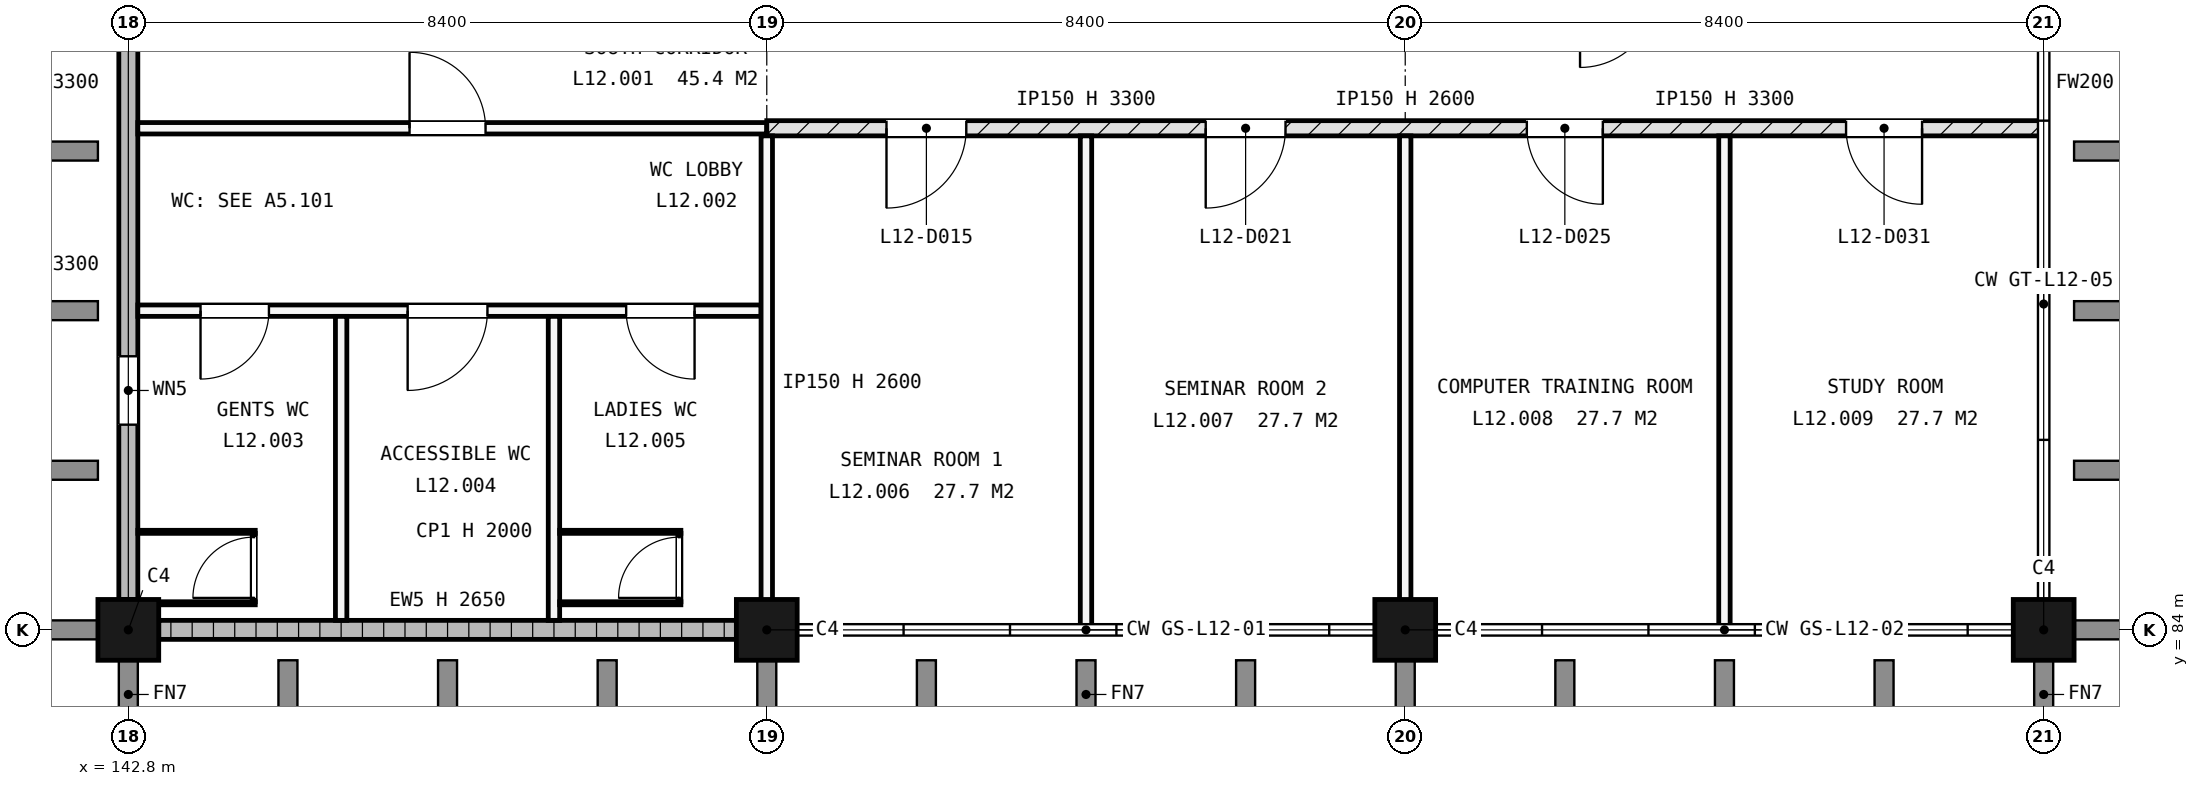
"""IFC4 building model, lengths in metres.
Left out: names, types, materials, properties, quantities, classifications, styles, units other than length and angle.
Written with IfcOpenShell. Run it as: python <this file> out.ifc"""

import sys

from ifc_helpers import new_model, si_unit, direction, frame, frame_2d, origin, origin_2d, place, context, subcontext, project, spatial, rectangle, extrude, element, fill, save


model = new_model("IFC4")
c1 = context("Model", 3, precision=1e-05, world=origin(), true_north=direction((0.0, 1.0)))
c2 = subcontext(c1, "Body", "Model", "MODEL_VIEW")
j1 = project(units=[si_unit("LENGTHUNIT", "METRE"), si_unit("PLANEANGLEUNIT", "RADIAN")], contexts=[c1])
p1 = place(None, origin())
s1 = spatial("IfcSite", under=j1, at=p1, CompositionType="ELEMENT")
p2 = place(p1, origin())
s2 = spatial("IfcBuilding", under=s1, at=p2, CompositionType="ELEMENT")
p3 = place(p2, frame((0.0, 0.0, 46.8)))
s3 = spatial("IfcBuildingStorey", under=s2, at=p3, CompositionType="ELEMENT", Elevation=46.8)
for number, where, z_axis, x_axis in (
    (1, (142.8, 84.0, -0.225), (0.0, 0.0, 1.0), (1.0, 0.0, 0.0)),
    (2, (151.2, 84.0, -0.225), (0.0, 0.0, 1.0), (1.0, 0.0, 0.0)),
    (3, (159.6, 84.0, -0.225), (0.0, 0.0, 1.0), (1.0, 0.0, 0.0)),
    (4, (168.0, 84.0, -0.225), (0.0, 0.0, 1.0), (1.0, 0.0, 0.0)),
):
    element("IfcColumn", number, at=place(p3, frame(where, z_axis=z_axis, x_axis=x_axis)), inside=s3, PredefinedType="COLUMN", context=c2, shape_type="SweptSolid", body=[
        extrude(rectangle(XDim=0.8, YDim=0.8, at=origin_2d()), origin(), (0.0, 0.0, 1.0), 3.525),
    ])
p4 = place(p3, frame((143.2, 84.0, 0.0), z_axis=(0.0, 0.0, 1.0), x_axis=(1.0, 0.0, 0.0)))
e5 = element("IfcWall", 5, at=p4, inside=s3, PredefinedType="STANDARD", context=c2, shape_type="SweptSolid", body=[
    extrude(rectangle(XDim=7.6, YDim=0.25, at=frame_2d((3.8, 0.0))), origin(), (0.0, 0.0, 1.0), 2.65),
])
p5 = place(p3, frame((142.8, 84.4, 0.0), z_axis=(0.0, 0.0, 1.0), x_axis=(0.0, 1.0, 0.0)))
e6 = element("IfcWall", 6, at=p5, inside=s3, PredefinedType="STANDARD", context=c2, shape_type="SweptSolid", body=[
    extrude(rectangle(XDim=7.8, YDim=0.25, at=frame_2d((3.9, 0.0))), origin(), (0.0, 0.0, 1.0), 3.3),
])
p6 = place(p5, frame((2.3, 0.0, 2.1)))
e7 = element("IfcOpeningElement", 7, at=p6, cuts=e6, PredefinedType="OPENING", context=c2, shape_type="SweptSolid", body=[
    extrude(rectangle(XDim=0.9, YDim=0.6, at=frame_2d((0.45, 0.3))), frame((0.0, 0.135, 0.0), z_axis=(0.0, -1.0, 0.0), x_axis=(1.0, 0.0, 0.0)), (0.0, 0.0, 1.0), 0.27),
])
p7 = place(p3, frame((142.925, 88.2, 0.0), z_axis=(0.0, 0.0, 1.0), x_axis=(1.0, 0.0, 0.0)))
e8 = element("IfcWall", 8, at=p7, inside=s3, PredefinedType="PARTITIONING", context=c2, shape_type="SweptSolid", body=[
    extrude(rectangle(XDim=8.2, YDim=0.15, at=frame_2d((4.1, 0.0))), origin(), (0.0, 0.0, 1.0), 3.3),
])
p8 = place(p7, frame((0.825, 0.0, 0.0)))
e9 = element("IfcOpeningElement", 9, at=p8, cuts=e8, PredefinedType="OPENING", context=c2, shape_type="SweptSolid", body=[
    extrude(rectangle(XDim=0.9, YDim=2.1, at=frame_2d((0.45, 1.05))), frame((0.0, 0.085, 0.0), z_axis=(0.0, -1.0, 0.0), x_axis=(1.0, 0.0, 0.0)), (0.0, 0.0, 1.0), 0.17),
])
p9 = place(p7, frame((3.55, 0.0, 0.0)))
e10 = element("IfcOpeningElement", 10, at=p9, cuts=e8, PredefinedType="OPENING", context=c2, shape_type="SweptSolid", body=[
    extrude(rectangle(XDim=1.05, YDim=2.25, at=frame_2d((0.525, 1.125))), frame((0.0, 0.085, 0.0), z_axis=(0.0, -1.0, 0.0), x_axis=(1.0, 0.0, 0.0)), (0.0, 0.0, 1.0), 0.17),
])
p10 = place(p7, frame((6.425, 0.0, 0.0)))
e11 = element("IfcOpeningElement", 11, at=p10, cuts=e8, PredefinedType="OPENING", context=c2, shape_type="SweptSolid", body=[
    extrude(rectangle(XDim=0.9, YDim=2.1, at=frame_2d((0.45, 1.05))), frame((0.0, 0.085, 0.0), z_axis=(0.0, -1.0, 0.0), x_axis=(1.0, 0.0, 0.0)), (0.0, 0.0, 1.0), 0.17),
])
p11 = place(p3, frame((142.925, 90.6, 0.0), z_axis=(0.0, 0.0, 1.0), x_axis=(1.0, 0.0, 0.0)))
e12 = element("IfcWall", 12, at=p11, inside=s3, PredefinedType="PARTITIONING", context=c2, shape_type="SweptSolid", body=[
    extrude(rectangle(XDim=8.275, YDim=0.15, at=frame_2d((4.137, 0.0))), origin(), (0.0, 0.0, 1.0), 3.3),
])
p12 = place(p11, frame((3.575, 0.0, 0.0)))
e13 = element("IfcOpeningElement", 13, at=p12, cuts=e12, PredefinedType="OPENING", context=c2, shape_type="SweptSolid", body=[
    extrude(rectangle(XDim=1.0, YDim=2.1, at=frame_2d((0.5, 1.05))), frame((0.0, 0.085, 0.0), z_axis=(0.0, -1.0, 0.0), x_axis=(1.0, 0.0, 0.0)), (0.0, 0.0, 1.0), 0.17),
])
p13 = place(p3, frame((151.2, 90.6, 0.0), z_axis=(0.0, 0.0, 1.0), x_axis=(1.0, 0.0, 0.0)))
e14 = element("IfcWall", 14, at=p13, inside=s3, PredefinedType="SOLIDWALL", context=c2, shape_type="SweptSolid", body=[
    extrude(rectangle(XDim=16.8, YDim=0.2, at=frame_2d((8.4, 0.0))), origin(), (0.0, 0.0, 1.0), 3.3),
])
p14 = place(p13, frame((1.575, 0.0, 0.0)))
e15 = element("IfcOpeningElement", 15, at=p14, cuts=e14, PredefinedType="OPENING", context=c2, shape_type="SweptSolid", body=[
    extrude(rectangle(XDim=1.05, YDim=2.1, at=frame_2d((0.525, 1.05))), frame((0.0, 0.11, 0.0), z_axis=(0.0, -1.0, 0.0), x_axis=(1.0, 0.0, 0.0)), (0.0, 0.0, 1.0), 0.22),
])
p15 = place(p13, frame((5.775, 0.0, 0.0)))
e16 = element("IfcOpeningElement", 16, at=p15, cuts=e14, PredefinedType="OPENING", context=c2, shape_type="SweptSolid", body=[
    extrude(rectangle(XDim=1.05, YDim=2.1, at=frame_2d((0.525, 1.05))), frame((0.0, 0.11, 0.0), z_axis=(0.0, -1.0, 0.0), x_axis=(1.0, 0.0, 0.0)), (0.0, 0.0, 1.0), 0.22),
])
p16 = place(p13, frame((10.0, 0.0, 0.0)))
e17 = element("IfcOpeningElement", 17, at=p16, cuts=e14, PredefinedType="OPENING", context=c2, shape_type="SweptSolid", body=[
    extrude(rectangle(XDim=1.0, YDim=2.1, at=frame_2d((0.5, 1.05))), frame((0.0, 0.11, 0.0), z_axis=(0.0, -1.0, 0.0), x_axis=(1.0, 0.0, 0.0)), (0.0, 0.0, 1.0), 0.22),
])
p17 = place(p13, frame((14.2, 0.0, 0.0)))
e18 = element("IfcOpeningElement", 18, at=p17, cuts=e14, PredefinedType="OPENING", context=c2, shape_type="SweptSolid", body=[
    extrude(rectangle(XDim=1.0, YDim=2.1, at=frame_2d((0.5, 1.05))), frame((0.0, 0.11, 0.0), z_axis=(0.0, -1.0, 0.0), x_axis=(1.0, 0.0, 0.0)), (0.0, 0.0, 1.0), 0.22),
])
for number, where, z_axis, x_axis in (
    (19, (145.6, 84.125, 0.0), (0.0, 0.0, 1.0), (0.0, 1.0, 0.0)),
    (20, (148.4, 84.125, 0.0), (0.0, 0.0, 1.0), (0.0, 1.0, 0.0)),
):
    element("IfcWall", number, at=place(p3, frame(where, z_axis=z_axis, x_axis=x_axis)), inside=s3, PredefinedType="PARTITIONING", context=c2, shape_type="SweptSolid", body=[
        extrude(rectangle(XDim=4.0, YDim=0.15, at=frame_2d((2.0, 0.0))), origin(), (0.0, 0.0, 1.0), 3.3),
    ])
p18 = place(p3, frame((151.2, 84.0, 0.0), z_axis=(0.0, 0.0, 1.0), x_axis=(0.0, 1.0, 0.0)))
e21 = element("IfcWall", 21, at=p18, inside=s3, PredefinedType="PARTITIONING", context=c2, shape_type="SweptSolid", body=[
    extrude(rectangle(XDim=6.5, YDim=0.15, at=frame_2d((3.25, 0.0))), origin(), (0.0, 0.0, 1.0), 2.6),
])
p19 = place(p3, frame((155.4, 84.0, 0.0), z_axis=(0.0, 0.0, 1.0), x_axis=(0.0, 1.0, 0.0)))
e22 = element("IfcWall", 22, at=p19, inside=s3, PredefinedType="PARTITIONING", context=c2, shape_type="SweptSolid", body=[
    extrude(rectangle(XDim=6.5, YDim=0.15, at=frame_2d((3.25, 0.0))), origin(), (0.0, 0.0, 1.0), 3.3),
])
p20 = place(p3, frame((159.6, 84.0, 0.0), z_axis=(0.0, 0.0, 1.0), x_axis=(0.0, 1.0, 0.0)))
e23 = element("IfcWall", 23, at=p20, inside=s3, PredefinedType="PARTITIONING", context=c2, shape_type="SweptSolid", body=[
    extrude(rectangle(XDim=6.5, YDim=0.15, at=frame_2d((3.25, 0.0))), origin(), (0.0, 0.0, 1.0), 2.6),
])
p21 = place(p3, frame((163.8, 84.0, 0.0), z_axis=(0.0, 0.0, 1.0), x_axis=(0.0, 1.0, 0.0)))
e24 = element("IfcWall", 24, at=p21, inside=s3, PredefinedType="PARTITIONING", context=c2, shape_type="SweptSolid", body=[
    extrude(rectangle(XDim=6.5, YDim=0.15, at=frame_2d((3.25, 0.0))), origin(), (0.0, 0.0, 1.0), 3.3),
])
p22 = place(p3, frame((142.93, 84.35, 0.0), z_axis=(0.0, 0.0, 1.0), x_axis=(1.0, 0.0, 0.0)))
e25 = element("IfcWall", 25, at=p22, inside=s3, PredefinedType="PARTITIONING", context=c2, shape_type="SweptSolid", body=[
    extrude(rectangle(XDim=1.54, YDim=0.04, at=frame_2d((0.77, 0.0))), origin(), (0.0, 0.0, 1.0), 2.0),
])
p23 = place(p3, frame((142.925, 85.29, 0.0), z_axis=(0.0, 0.0, 1.0), x_axis=(1.0, 0.0, 0.0)))
e26 = element("IfcWall", 26, at=p23, inside=s3, PredefinedType="PARTITIONING", context=c2, shape_type="SweptSolid", body=[
    extrude(rectangle(XDim=1.545, YDim=0.04, at=frame_2d((0.772, 0.0))), origin(), (0.0, 0.0, 1.0), 2.0),
])
p24 = place(p3, frame((144.45, 84.37, 0.0), z_axis=(0.0, 0.0, 1.0), x_axis=(0.0, 1.0, 0.0)))
e27 = element("IfcWall", 27, at=p24, inside=s3, PredefinedType="PARTITIONING", context=c2, shape_type="SweptSolid", body=[
    extrude(rectangle(XDim=0.9, YDim=0.04, at=frame_2d((0.45, 0.0))), origin(), (0.0, 0.0, 1.0), 2.0),
])
p25 = place(p24, frame((0.05, 0.0, 0.0)))
e28 = element("IfcOpeningElement", 28, at=p25, cuts=e27, PredefinedType="OPENING", context=c2, shape_type="SweptSolid", body=[
    extrude(rectangle(XDim=0.8, YDim=2.0, at=frame_2d((0.4, 1.0))), frame((0.0, 0.03, 0.0), z_axis=(0.0, -1.0, 0.0), x_axis=(1.0, 0.0, 0.0)), (0.0, 0.0, 1.0), 0.06),
])
for number, where, z_axis, x_axis in (
    (29, (148.475, 84.35, 0.0), (0.0, 0.0, 1.0), (1.0, 0.0, 0.0)),
    (30, (148.475, 85.29, 0.0), (0.0, 0.0, 1.0), (1.0, 0.0, 0.0)),
):
    element("IfcWall", number, at=place(p3, frame(where, z_axis=z_axis, x_axis=x_axis)), inside=s3, PredefinedType="PARTITIONING", context=c2, shape_type="SweptSolid", body=[
        extrude(rectangle(XDim=1.595, YDim=0.04, at=frame_2d((0.797, 0.0))), origin(), (0.0, 0.0, 1.0), 2.0),
    ])
p26 = place(p3, frame((150.05, 84.37, 0.0), z_axis=(0.0, 0.0, 1.0), x_axis=(0.0, 1.0, 0.0)))
e31 = element("IfcWall", 31, at=p26, inside=s3, PredefinedType="PARTITIONING", context=c2, shape_type="SweptSolid", body=[
    extrude(rectangle(XDim=0.9, YDim=0.04, at=frame_2d((0.45, 0.0))), origin(), (0.0, 0.0, 1.0), 2.0),
])
p27 = place(p26, frame((0.05, 0.0, 0.0)))
e32 = element("IfcOpeningElement", 32, at=p27, cuts=e31, PredefinedType="OPENING", context=c2, shape_type="SweptSolid", body=[
    extrude(rectangle(XDim=0.8, YDim=2.0, at=frame_2d((0.4, 1.0))), frame((0.0, 0.03, 0.0), z_axis=(0.0, -1.0, 0.0), x_axis=(1.0, 0.0, 0.0)), (0.0, 0.0, 1.0), 0.06),
])
p28 = place(p6, origin())
e33 = element("IfcWindow", 33, at=p28, inside=s3, PartitioningType="SINGLE_PANEL", PredefinedType="WINDOW", context=c2, shape_type="SweptSolid", body=[
    extrude(rectangle(XDim=0.9, YDim=0.6, at=frame_2d((0.45, 0.3))), frame((0.0, 0.03, 0.0), z_axis=(0.0, -1.0, 0.0), x_axis=(1.0, 0.0, 0.0)), (0.0, 0.0, 1.0), 0.06),
])
fill(e7, e33)
p29 = place(p8, origin())
e34 = element("IfcDoor", 34, at=p29, inside=s3, OperationType="SINGLE_SWING_LEFT", PredefinedType="DOOR", context=c2, shape_type="SweptSolid", body=[
    extrude(rectangle(XDim=0.9, YDim=2.1, at=frame_2d((0.45, 1.05))), frame((0.0, 0.025, 0.0), z_axis=(0.0, -1.0, 0.0), x_axis=(1.0, 0.0, 0.0)), (0.0, 0.0, 1.0), 0.05),
])
fill(e9, e34)
p30 = place(p9, origin())
e35 = element("IfcDoor", 35, at=p30, inside=s3, OperationType="SINGLE_SWING_LEFT", PredefinedType="DOOR", context=c2, shape_type="SweptSolid", body=[
    extrude(rectangle(XDim=1.05, YDim=2.25, at=frame_2d((0.525, 1.125))), frame((0.0, 0.025, 0.0), z_axis=(0.0, -1.0, 0.0), x_axis=(1.0, 0.0, 0.0)), (0.0, 0.0, 1.0), 0.05),
])
fill(e10, e35)
p31 = place(p10, origin())
e36 = element("IfcDoor", 36, at=p31, inside=s3, OperationType="SINGLE_SWING_RIGHT", PredefinedType="DOOR", context=c2, shape_type="SweptSolid", body=[
    extrude(rectangle(XDim=0.9, YDim=2.1, at=frame_2d((0.45, 1.05))), frame((0.0, 0.025, 0.0), z_axis=(0.0, -1.0, 0.0), x_axis=(1.0, 0.0, 0.0)), (0.0, 0.0, 1.0), 0.05),
])
fill(e11, e36)
p32 = place(p14, origin())
e37 = element("IfcDoor", 37, at=p32, inside=s3, OperationType="SINGLE_SWING_LEFT", PredefinedType="DOOR", context=c2, shape_type="SweptSolid", body=[
    extrude(rectangle(XDim=1.05, YDim=2.1, at=frame_2d((0.525, 1.05))), frame((0.0, 0.025, 0.0), z_axis=(0.0, -1.0, 0.0), x_axis=(1.0, 0.0, 0.0)), (0.0, 0.0, 1.0), 0.05),
])
fill(e15, e37)
p33 = place(p15, origin())
e38 = element("IfcDoor", 38, at=p33, inside=s3, OperationType="SINGLE_SWING_LEFT", PredefinedType="DOOR", context=c2, shape_type="SweptSolid", body=[
    extrude(rectangle(XDim=1.05, YDim=2.1, at=frame_2d((0.525, 1.05))), frame((0.0, 0.025, 0.0), z_axis=(0.0, -1.0, 0.0), x_axis=(1.0, 0.0, 0.0)), (0.0, 0.0, 1.0), 0.05),
])
fill(e16, e38)
p34 = place(p16, origin())
e39 = element("IfcDoor", 39, at=p34, inside=s3, OperationType="SINGLE_SWING_RIGHT", PredefinedType="DOOR", context=c2, shape_type="SweptSolid", body=[
    extrude(rectangle(XDim=1.0, YDim=2.1, at=frame_2d((0.5, 1.05))), frame((0.0, 0.025, 0.0), z_axis=(0.0, -1.0, 0.0), x_axis=(1.0, 0.0, 0.0)), (0.0, 0.0, 1.0), 0.05),
])
fill(e17, e39)
p35 = place(p17, origin())
e40 = element("IfcDoor", 40, at=p35, inside=s3, OperationType="SINGLE_SWING_RIGHT", PredefinedType="DOOR", context=c2, shape_type="SweptSolid", body=[
    extrude(rectangle(XDim=1.0, YDim=2.1, at=frame_2d((0.5, 1.05))), frame((0.0, 0.025, 0.0), z_axis=(0.0, -1.0, 0.0), x_axis=(1.0, 0.0, 0.0)), (0.0, 0.0, 1.0), 0.05),
])
fill(e18, e40)
p36 = place(p12, origin())
e41 = element("IfcDoor", 41, at=p36, inside=s3, OperationType="SINGLE_SWING_RIGHT", PredefinedType="DOOR", context=c2, shape_type="SweptSolid", body=[
    extrude(rectangle(XDim=1.0, YDim=2.1, at=frame_2d((0.5, 1.05))), frame((0.0, 0.025, 0.0), z_axis=(0.0, -1.0, 0.0), x_axis=(1.0, 0.0, 0.0)), (0.0, 0.0, 1.0), 0.05),
])
fill(e13, e41)
p37 = place(p25, origin())
e42 = element("IfcDoor", 42, at=p37, inside=s3, OperationType="SINGLE_SWING_LEFT", PredefinedType="DOOR", context=c2, shape_type="SweptSolid", body=[
    extrude(rectangle(XDim=0.8, YDim=2.0, at=frame_2d((0.4, 1.0))), frame((0.0, 0.02, 0.0), z_axis=(0.0, -1.0, 0.0), x_axis=(1.0, 0.0, 0.0)), (0.0, 0.0, 1.0), 0.04),
])
fill(e28, e42)
p38 = place(p27, origin())
e43 = element("IfcDoor", 43, at=p38, inside=s3, OperationType="SINGLE_SWING_LEFT", PredefinedType="DOOR", context=c2, shape_type="SweptSolid", body=[
    extrude(rectangle(XDim=0.8, YDim=2.0, at=frame_2d((0.4, 1.0))), frame((0.0, 0.02, 0.0), z_axis=(0.0, -1.0, 0.0), x_axis=(1.0, 0.0, 0.0)), (0.0, 0.0, 1.0), 0.04),
])
fill(e32, e43)
save(model, sys.argv[1])
